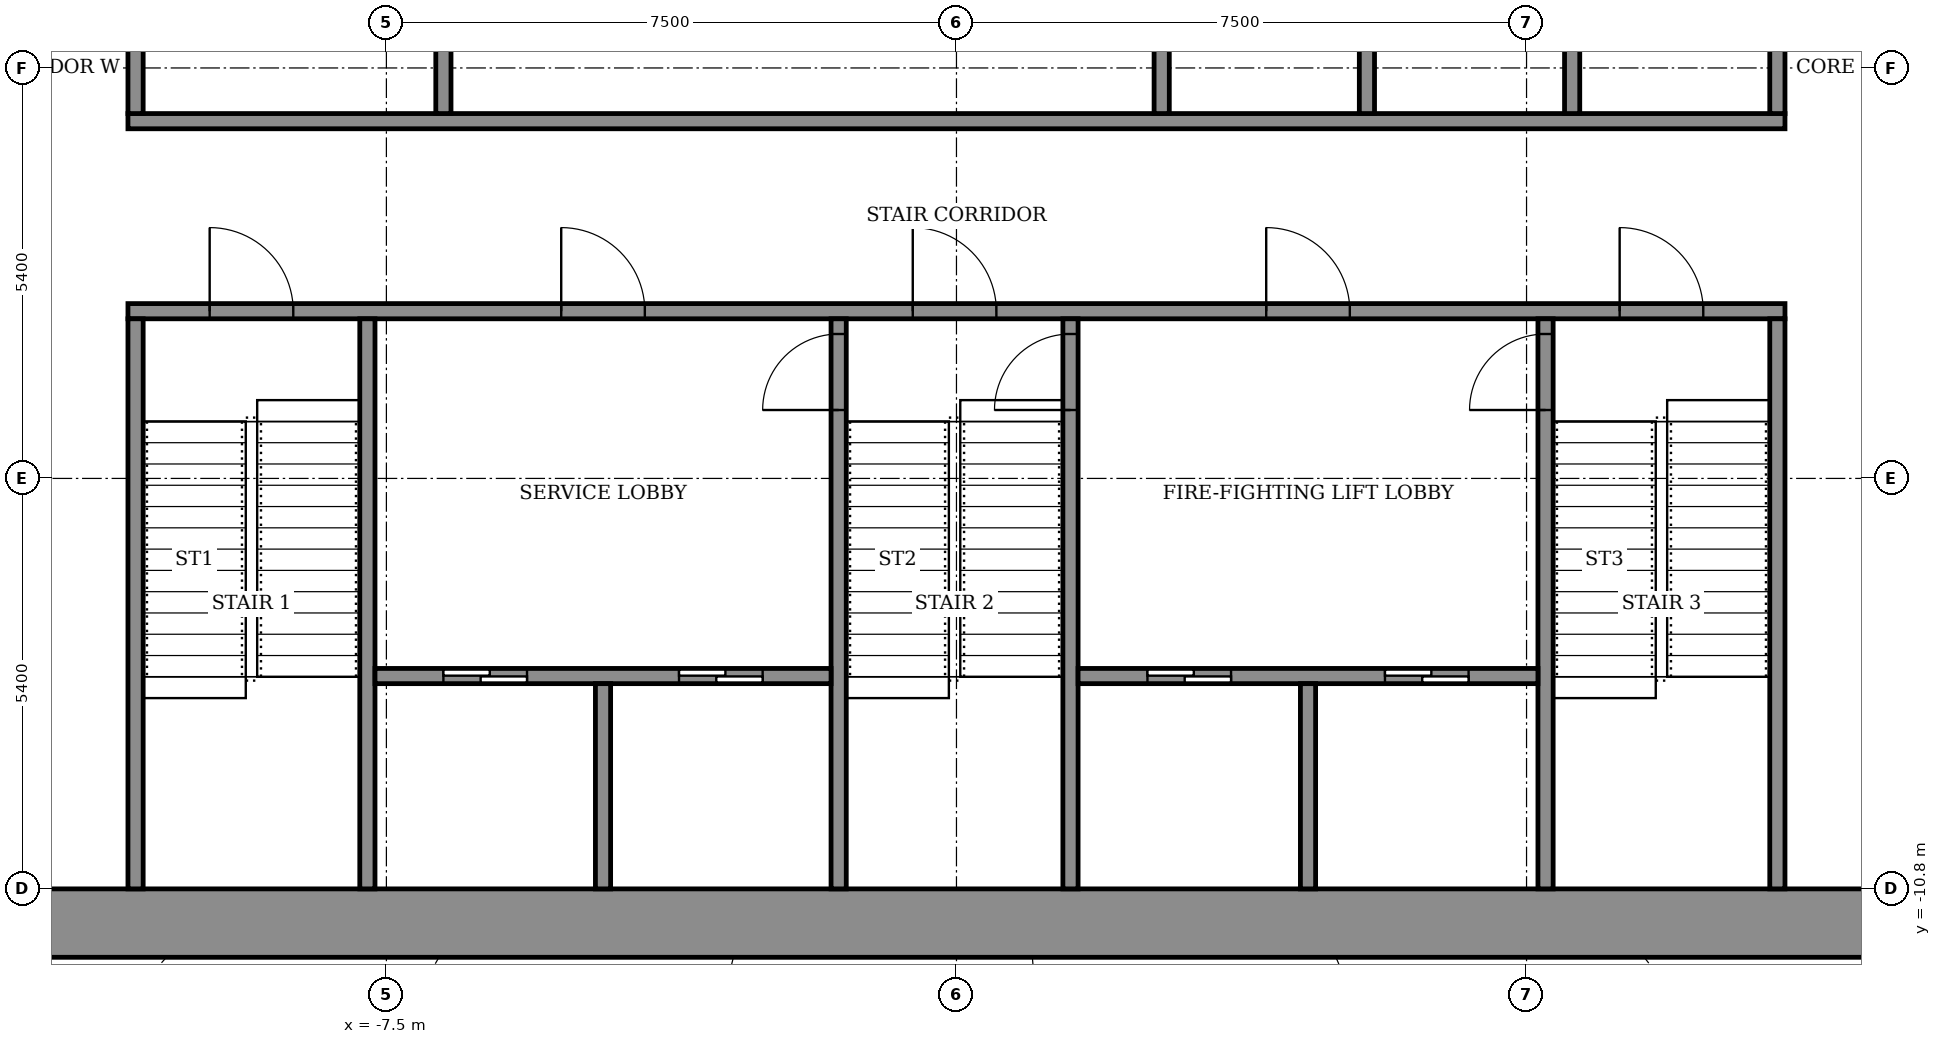
"""IFC4 building model, lengths in metres.
Left out: names, types, materials, properties, quantities, classifications, styles, units other than length and angle.
Written with IfcOpenShell. Run it as: python <this file> out.ifc"""

import sys

from ifc_helpers import new_model, si_unit, direction, frame, frame_2d, origin, place, context, subcontext, project, spatial, rectangle, extrude, element, fill, save


model = new_model("IFC4")
c1 = context("Model", 3, precision=1e-05, world=origin(), true_north=direction((0.0, 1.0)))
c2 = subcontext(c1, "Body", "Model", "MODEL_VIEW")
j1 = project(units=[si_unit("LENGTHUNIT", "METRE"), si_unit("PLANEANGLEUNIT", "RADIAN")], contexts=[c1])
p1 = place(None, origin())
s1 = spatial("IfcSite", under=j1, at=p1, CompositionType="ELEMENT")
p2 = place(p1, origin())
s2 = spatial("IfcBuilding", under=s1, at=p2, CompositionType="ELEMENT")
p3 = place(p2, frame((0.0, 0.0, 170.7)))
s3 = spatial("IfcBuildingStorey", under=s2, at=p3, CompositionType="ELEMENT", Elevation=170.7)
p4 = place(p3, frame((-14.7, -11.25, 0.0), z_axis=(0.0, 0.0, 1.0), x_axis=(1.0, 0.0, 0.0)))
e1 = element("IfcWall", 1, at=p4, inside=s3, PredefinedType="SHEAR", context=c2, shape_type="SweptSolid", body=[
    extrude(rectangle(XDim=29.4, YDim=0.9, at=frame_2d((14.7, 0.0))), origin(), (0.0, 0.0, 1.0), 4.6),
])
p5 = place(p3, frame((-10.9, -3.2, 0.0), z_axis=(0.0, 0.0, 1.0), x_axis=(1.0, 0.0, 0.0)))
e2 = element("IfcWall", 2, at=p5, inside=s3, PredefinedType="SHEAR", context=c2, shape_type="SweptSolid", body=[
    extrude(rectangle(XDim=21.8, YDim=0.2, at=frame_2d((10.9, 0.0))), origin(), (0.0, 0.0, 1.0), 4.05),
])
p6 = place(p5, frame((1.075, 0.0, 0.0)))
e3 = element("IfcOpeningElement", 3, at=p6, cuts=e2, PredefinedType="OPENING", context=c2, shape_type="SweptSolid", body=[
    extrude(rectangle(XDim=1.1, YDim=2.1, at=frame_2d((0.55, 1.05))), frame((0.0, 0.11, 0.0), z_axis=(0.0, -1.0, 0.0), x_axis=(1.0, 0.0, 0.0)), (0.0, 0.0, 1.0), 0.22),
])
p7 = place(p5, frame((10.325, 0.0, 0.0)))
e4 = element("IfcOpeningElement", 4, at=p7, cuts=e2, PredefinedType="OPENING", context=c2, shape_type="SweptSolid", body=[
    extrude(rectangle(XDim=1.1, YDim=2.1, at=frame_2d((0.55, 1.05))), frame((0.0, 0.11, 0.0), z_axis=(0.0, -1.0, 0.0), x_axis=(1.0, 0.0, 0.0)), (0.0, 0.0, 1.0), 0.22),
])
p8 = place(p5, frame((19.625, 0.0, 0.0)))
e5 = element("IfcOpeningElement", 5, at=p8, cuts=e2, PredefinedType="OPENING", context=c2, shape_type="SweptSolid", body=[
    extrude(rectangle(XDim=1.1, YDim=2.1, at=frame_2d((0.55, 1.05))), frame((0.0, 0.11, 0.0), z_axis=(0.0, -1.0, 0.0), x_axis=(1.0, 0.0, 0.0)), (0.0, 0.0, 1.0), 0.22),
])
p9 = place(p5, frame((5.7, 0.0, 0.0)))
e6 = element("IfcOpeningElement", 6, at=p9, cuts=e2, PredefinedType="OPENING", context=c2, shape_type="SweptSolid", body=[
    extrude(rectangle(XDim=1.1, YDim=2.1, at=frame_2d((0.55, 1.05))), frame((0.0, 0.11, 0.0), z_axis=(0.0, -1.0, 0.0), x_axis=(1.0, 0.0, 0.0)), (0.0, 0.0, 1.0), 0.22),
])
p10 = place(p5, frame((14.975, 0.0, 0.0)))
e7 = element("IfcOpeningElement", 7, at=p10, cuts=e2, PredefinedType="OPENING", context=c2, shape_type="SweptSolid", body=[
    extrude(rectangle(XDim=1.1, YDim=2.1, at=frame_2d((0.55, 1.05))), frame((0.0, 0.11, 0.0), z_axis=(0.0, -1.0, 0.0), x_axis=(1.0, 0.0, 0.0)), (0.0, 0.0, 1.0), 0.22),
])
p11 = place(p3, frame((-10.9, -0.7, 0.0), z_axis=(0.0, 0.0, 1.0), x_axis=(1.0, 0.0, 0.0)))
e8 = element("IfcWall", 8, at=p11, inside=s3, PredefinedType="SHEAR", context=c2, shape_type="SweptSolid", body=[
    extrude(rectangle(XDim=21.8, YDim=0.2, at=frame_2d((10.9, 0.0))), origin(), (0.0, 0.0, 1.0), 4.05),
])
for number, where, z_axis, x_axis in (
    (9, (-10.8, -10.8, 0.0), (0.0, 0.0, 1.0), (0.0, 1.0, 0.0)),
    (10, (-7.75, -10.8, 0.0), (0.0, 0.0, 1.0), (0.0, 1.0, 0.0)),
):
    element("IfcWall", number, at=place(p3, frame(where, z_axis=z_axis, x_axis=x_axis)), inside=s3, PredefinedType="SHEAR", context=c2, shape_type="SweptSolid", body=[
        extrude(rectangle(XDim=7.5, YDim=0.2, at=frame_2d((3.75, 0.0))), origin(), (0.0, 0.0, 1.0), 4.05),
    ])
p12 = place(p3, frame((-1.55, -10.8, 0.0), z_axis=(0.0, 0.0, 1.0), x_axis=(0.0, 1.0, 0.0)))
e11 = element("IfcWall", 11, at=p12, inside=s3, PredefinedType="SHEAR", context=c2, shape_type="SweptSolid", body=[
    extrude(rectangle(XDim=7.5, YDim=0.2, at=frame_2d((3.75, 0.0))), origin(), (0.0, 0.0, 1.0), 4.05),
])
p13 = place(p12, frame((6.3, 0.0, 0.0)))
e12 = element("IfcOpeningElement", 12, at=p13, cuts=e11, PredefinedType="OPENING", context=c2, shape_type="SweptSolid", body=[
    extrude(rectangle(XDim=1.0, YDim=2.1, at=frame_2d((0.5, 1.05))), frame((0.0, 0.11, 0.0), z_axis=(0.0, -1.0, 0.0), x_axis=(1.0, 0.0, 0.0)), (0.0, 0.0, 1.0), 0.22),
])
p14 = place(p3, frame((1.5, -10.8, 0.0), z_axis=(0.0, 0.0, 1.0), x_axis=(0.0, 1.0, 0.0)))
e13 = element("IfcWall", 13, at=p14, inside=s3, PredefinedType="SHEAR", context=c2, shape_type="SweptSolid", body=[
    extrude(rectangle(XDim=7.5, YDim=0.2, at=frame_2d((3.75, 0.0))), origin(), (0.0, 0.0, 1.0), 4.05),
])
p15 = place(p14, frame((6.3, 0.0, 0.0)))
e14 = element("IfcOpeningElement", 14, at=p15, cuts=e13, PredefinedType="OPENING", context=c2, shape_type="SweptSolid", body=[
    extrude(rectangle(XDim=1.0, YDim=2.1, at=frame_2d((0.5, 1.05))), frame((0.0, 0.11, 0.0), z_axis=(0.0, -1.0, 0.0), x_axis=(1.0, 0.0, 0.0)), (0.0, 0.0, 1.0), 0.22),
])
p16 = place(p3, frame((7.75, -10.8, 0.0), z_axis=(0.0, 0.0, 1.0), x_axis=(0.0, 1.0, 0.0)))
e15 = element("IfcWall", 15, at=p16, inside=s3, PredefinedType="SHEAR", context=c2, shape_type="SweptSolid", body=[
    extrude(rectangle(XDim=7.5, YDim=0.2, at=frame_2d((3.75, 0.0))), origin(), (0.0, 0.0, 1.0), 4.05),
])
p17 = place(p16, frame((6.3, 0.0, 0.0)))
e16 = element("IfcOpeningElement", 16, at=p17, cuts=e15, PredefinedType="OPENING", context=c2, shape_type="SweptSolid", body=[
    extrude(rectangle(XDim=1.0, YDim=2.1, at=frame_2d((0.5, 1.05))), frame((0.0, 0.11, 0.0), z_axis=(0.0, -1.0, 0.0), x_axis=(1.0, 0.0, 0.0)), (0.0, 0.0, 1.0), 0.22),
])
p18 = place(p3, frame((10.8, -10.8, 0.0), z_axis=(0.0, 0.0, 1.0), x_axis=(0.0, 1.0, 0.0)))
e17 = element("IfcWall", 17, at=p18, inside=s3, PredefinedType="SHEAR", context=c2, shape_type="SweptSolid", body=[
    extrude(rectangle(XDim=7.5, YDim=0.2, at=frame_2d((3.75, 0.0))), origin(), (0.0, 0.0, 1.0), 4.05),
])
p19 = place(p3, frame((-7.65, -8.0, 0.0), z_axis=(0.0, 0.0, 1.0), x_axis=(1.0, 0.0, 0.0)))
e18 = element("IfcWall", 18, at=p19, inside=s3, PredefinedType="SHEAR", context=c2, shape_type="SweptSolid", body=[
    extrude(rectangle(XDim=6.0, YDim=0.2, at=frame_2d((3.0, 0.0))), origin(), (0.0, 0.0, 1.0), 4.05),
])
p20 = place(p19, frame((0.9, 0.0, 0.0)))
e19 = element("IfcOpeningElement", 19, at=p20, cuts=e18, PredefinedType="OPENING", context=c2, shape_type="SweptSolid", body=[
    extrude(rectangle(XDim=1.1, YDim=2.1, at=frame_2d((0.55, 1.05))), frame((0.0, 0.11, 0.0), z_axis=(0.0, -1.0, 0.0), x_axis=(1.0, 0.0, 0.0)), (0.0, 0.0, 1.0), 0.22),
])
p21 = place(p19, frame((4.0, 0.0, 0.0)))
e20 = element("IfcOpeningElement", 20, at=p21, cuts=e18, PredefinedType="OPENING", context=c2, shape_type="SweptSolid", body=[
    extrude(rectangle(XDim=1.1, YDim=2.1, at=frame_2d((0.55, 1.05))), frame((0.0, 0.11, 0.0), z_axis=(0.0, -1.0, 0.0), x_axis=(1.0, 0.0, 0.0)), (0.0, 0.0, 1.0), 0.22),
])
p22 = place(p3, frame((-4.65, -10.8, 0.0), z_axis=(0.0, 0.0, 1.0), x_axis=(0.0, 1.0, 0.0)))
e21 = element("IfcWall", 21, at=p22, inside=s3, PredefinedType="SHEAR", context=c2, shape_type="SweptSolid", body=[
    extrude(rectangle(XDim=2.7, YDim=0.2, at=frame_2d((1.35, 0.0))), origin(), (0.0, 0.0, 1.0), 4.05),
])
p23 = place(p3, frame((1.6, -8.0, 0.0), z_axis=(0.0, 0.0, 1.0), x_axis=(1.0, 0.0, 0.0)))
e22 = element("IfcWall", 22, at=p23, inside=s3, PredefinedType="SHEAR", context=c2, shape_type="SweptSolid", body=[
    extrude(rectangle(XDim=6.05, YDim=0.2, at=frame_2d((3.025, 0.0))), origin(), (0.0, 0.0, 1.0), 4.05),
])
p24 = place(p23, frame((0.913, 0.0, 0.0)))
e23 = element("IfcOpeningElement", 23, at=p24, cuts=e22, PredefinedType="OPENING", context=c2, shape_type="SweptSolid", body=[
    extrude(rectangle(XDim=1.1, YDim=2.1, at=frame_2d((0.55, 1.05))), frame((0.0, 0.11, 0.0), z_axis=(0.0, -1.0, 0.0), x_axis=(1.0, 0.0, 0.0)), (0.0, 0.0, 1.0), 0.22),
])
p25 = place(p23, frame((4.038, 0.0, 0.0)))
e24 = element("IfcOpeningElement", 24, at=p25, cuts=e22, PredefinedType="OPENING", context=c2, shape_type="SweptSolid", body=[
    extrude(rectangle(XDim=1.1, YDim=2.1, at=frame_2d((0.55, 1.05))), frame((0.0, 0.11, 0.0), z_axis=(0.0, -1.0, 0.0), x_axis=(1.0, 0.0, 0.0)), (0.0, 0.0, 1.0), 0.22),
])
p26 = place(p3, frame((4.625, -10.8, 0.0), z_axis=(0.0, 0.0, 1.0), x_axis=(0.0, 1.0, 0.0)))
e25 = element("IfcWall", 25, at=p26, inside=s3, PredefinedType="SHEAR", context=c2, shape_type="SweptSolid", body=[
    extrude(rectangle(XDim=2.7, YDim=0.2, at=frame_2d((1.35, 0.0))), origin(), (0.0, 0.0, 1.0), 4.05),
])
for number, where, z_axis, x_axis in (
    (26, (-10.8, -0.6, 0.0), (0.0, 0.0, 1.0), (0.0, 1.0, 0.0)),
    (27, (-6.75, -0.6, 0.0), (0.0, 0.0, 1.0), (0.0, 1.0, 0.0)),
):
    element("IfcWall", number, at=place(p3, frame(where, z_axis=z_axis, x_axis=x_axis)), inside=s3, PredefinedType="STANDARD", context=c2, shape_type="SweptSolid", body=[
        extrude(rectangle(XDim=2.5, YDim=0.2, at=frame_2d((1.25, 0.0))), origin(), (0.0, 0.0, 1.0), 4.05),
    ])
for number, where, z_axis, x_axis in (
    (28, (2.7, -0.6, 0.0), (0.0, 0.0, 1.0), (0.0, 1.0, 0.0)),
    (29, (5.4, -0.6, 0.0), (0.0, 0.0, 1.0), (0.0, 1.0, 0.0)),
    (30, (8.1, -0.6, 0.0), (0.0, 0.0, 1.0), (0.0, 1.0, 0.0)),
    (31, (10.8, -0.6, 0.0), (0.0, 0.0, 1.0), (0.0, 1.0, 0.0)),
):
    element("IfcWall", number, at=place(p3, frame(where, z_axis=z_axis, x_axis=x_axis)), inside=s3, PredefinedType="SHEAR", context=c2, shape_type="SweptSolid", body=[
        extrude(rectangle(XDim=2.5, YDim=0.2, at=frame_2d((1.25, 0.0))), origin(), (0.0, 0.0, 1.0), 4.05),
    ])
p27 = place(p24, origin())
e32 = element("IfcDoor", 32, at=p27, inside=s3, OperationType="SLIDING_TO_LEFT", PredefinedType="DOOR", context=c2, shape_type="SweptSolid", body=[
    extrude(rectangle(XDim=1.1, YDim=2.1, at=frame_2d((0.55, 1.05))), frame((0.0, 0.025, 0.0), z_axis=(0.0, -1.0, 0.0), x_axis=(1.0, 0.0, 0.0)), (0.0, 0.0, 1.0), 0.05),
])
fill(e23, e32)
p28 = place(p20, origin())
e33 = element("IfcDoor", 33, at=p28, inside=s3, OperationType="SLIDING_TO_LEFT", PredefinedType="DOOR", context=c2, shape_type="SweptSolid", body=[
    extrude(rectangle(XDim=1.1, YDim=2.1, at=frame_2d((0.55, 1.05))), frame((0.0, 0.025, 0.0), z_axis=(0.0, -1.0, 0.0), x_axis=(1.0, 0.0, 0.0)), (0.0, 0.0, 1.0), 0.05),
])
fill(e19, e33)
p29 = place(p25, origin())
e34 = element("IfcDoor", 34, at=p29, inside=s3, OperationType="SLIDING_TO_LEFT", PredefinedType="DOOR", context=c2, shape_type="SweptSolid", body=[
    extrude(rectangle(XDim=1.1, YDim=2.1, at=frame_2d((0.55, 1.05))), frame((0.0, 0.025, 0.0), z_axis=(0.0, -1.0, 0.0), x_axis=(1.0, 0.0, 0.0)), (0.0, 0.0, 1.0), 0.05),
])
fill(e24, e34)
p30 = place(p21, origin())
e35 = element("IfcDoor", 35, at=p30, inside=s3, OperationType="SLIDING_TO_LEFT", PredefinedType="DOOR", context=c2, shape_type="SweptSolid", body=[
    extrude(rectangle(XDim=1.1, YDim=2.1, at=frame_2d((0.55, 1.05))), frame((0.0, 0.025, 0.0), z_axis=(0.0, -1.0, 0.0), x_axis=(1.0, 0.0, 0.0)), (0.0, 0.0, 1.0), 0.05),
])
fill(e20, e35)
p31 = place(p6, origin())
e36 = element("IfcDoor", 36, at=p31, inside=s3, OperationType="SINGLE_SWING_RIGHT", PredefinedType="DOOR", context=c2, shape_type="SweptSolid", body=[
    extrude(rectangle(XDim=1.1, YDim=2.1, at=frame_2d((0.55, 1.05))), frame((0.0, 0.025, 0.0), z_axis=(0.0, -1.0, 0.0), x_axis=(1.0, 0.0, 0.0)), (0.0, 0.0, 1.0), 0.05),
])
fill(e3, e36)
p32 = place(p7, origin())
e37 = element("IfcDoor", 37, at=p32, inside=s3, OperationType="SINGLE_SWING_RIGHT", PredefinedType="DOOR", context=c2, shape_type="SweptSolid", body=[
    extrude(rectangle(XDim=1.1, YDim=2.1, at=frame_2d((0.55, 1.05))), frame((0.0, 0.025, 0.0), z_axis=(0.0, -1.0, 0.0), x_axis=(1.0, 0.0, 0.0)), (0.0, 0.0, 1.0), 0.05),
])
fill(e4, e37)
p33 = place(p8, origin())
e38 = element("IfcDoor", 38, at=p33, inside=s3, OperationType="SINGLE_SWING_RIGHT", PredefinedType="DOOR", context=c2, shape_type="SweptSolid", body=[
    extrude(rectangle(XDim=1.1, YDim=2.1, at=frame_2d((0.55, 1.05))), frame((0.0, 0.025, 0.0), z_axis=(0.0, -1.0, 0.0), x_axis=(1.0, 0.0, 0.0)), (0.0, 0.0, 1.0), 0.05),
])
fill(e5, e38)
p34 = place(p9, origin())
e39 = element("IfcDoor", 39, at=p34, inside=s3, OperationType="SINGLE_SWING_LEFT", PredefinedType="DOOR", context=c2, shape_type="SweptSolid", body=[
    extrude(rectangle(XDim=1.1, YDim=2.1, at=frame_2d((0.55, 1.05))), frame((0.0, 0.025, 0.0), z_axis=(0.0, -1.0, 0.0), x_axis=(1.0, 0.0, 0.0)), (0.0, 0.0, 1.0), 0.05),
])
fill(e6, e39)
p35 = place(p10, origin())
e40 = element("IfcDoor", 40, at=p35, inside=s3, OperationType="SINGLE_SWING_LEFT", PredefinedType="DOOR", context=c2, shape_type="SweptSolid", body=[
    extrude(rectangle(XDim=1.1, YDim=2.1, at=frame_2d((0.55, 1.05))), frame((0.0, 0.025, 0.0), z_axis=(0.0, -1.0, 0.0), x_axis=(1.0, 0.0, 0.0)), (0.0, 0.0, 1.0), 0.05),
])
fill(e7, e40)
p36 = place(p13, origin())
e41 = element("IfcDoor", 41, at=p36, inside=s3, OperationType="SINGLE_SWING_RIGHT", PredefinedType="DOOR", context=c2, shape_type="SweptSolid", body=[
    extrude(rectangle(XDim=1.0, YDim=2.1, at=frame_2d((0.5, 1.05))), frame((0.0, 0.025, 0.0), z_axis=(0.0, -1.0, 0.0), x_axis=(1.0, 0.0, 0.0)), (0.0, 0.0, 1.0), 0.05),
])
fill(e12, e41)
p37 = place(p15, origin())
e42 = element("IfcDoor", 42, at=p37, inside=s3, OperationType="SINGLE_SWING_RIGHT", PredefinedType="DOOR", context=c2, shape_type="SweptSolid", body=[
    extrude(rectangle(XDim=1.0, YDim=2.1, at=frame_2d((0.5, 1.05))), frame((0.0, 0.025, 0.0), z_axis=(0.0, -1.0, 0.0), x_axis=(1.0, 0.0, 0.0)), (0.0, 0.0, 1.0), 0.05),
])
fill(e14, e42)
p38 = place(p17, origin())
e43 = element("IfcDoor", 43, at=p38, inside=s3, OperationType="SINGLE_SWING_RIGHT", PredefinedType="DOOR", context=c2, shape_type="SweptSolid", body=[
    extrude(rectangle(XDim=1.0, YDim=2.1, at=frame_2d((0.5, 1.05))), frame((0.0, 0.025, 0.0), z_axis=(0.0, -1.0, 0.0), x_axis=(1.0, 0.0, 0.0)), (0.0, 0.0, 1.0), 0.05),
])
fill(e16, e43)
save(model, sys.argv[1])
